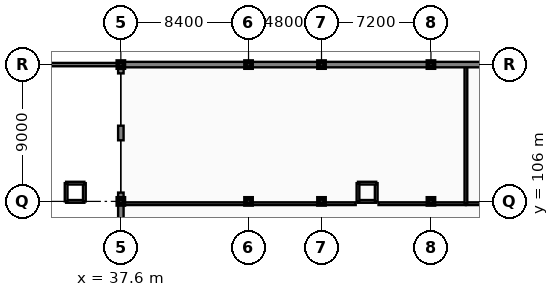
"""IFC4 building model, lengths in metres.
Left out: names, types, materials, properties, quantities, classifications, styles, units other than length and angle.
Written with IfcOpenShell. Run it as: python <this file> out.ifc"""

import sys

from ifc_helpers import new_model, si_unit, direction, frame, frame_2d, origin, origin_2d, place, context, subcontext, project, spatial, rectangle, extrude, element, fill, save


model = new_model("IFC4")
c1 = context("Model", 3, precision=1e-05, world=origin(), true_north=direction((0.0, 1.0)))
c2 = subcontext(c1, "Body", "Model", "MODEL_VIEW")
j1 = project(units=[si_unit("LENGTHUNIT", "METRE"), si_unit("PLANEANGLEUNIT", "RADIAN")], contexts=[c1])
p1 = place(None, origin())
s1 = spatial("IfcSite", under=j1, at=p1, CompositionType="ELEMENT")
p2 = place(p1, origin())
s2 = spatial("IfcBuilding", under=s1, at=p2, CompositionType="ELEMENT")
p3 = place(p2, frame((0.0, 0.0, 17.7)))
s3 = spatial("IfcBuildingStorey", under=s2, at=p3, CompositionType="ELEMENT", Elevation=17.7)
for number, where, z_axis, x_axis in (
    (1, (37.6, 106.0, 0.0), (0.0, 0.0, 1.0), (1.0, 0.0, 0.0)),
    (2, (37.6, 115.0, 0.0), (0.0, 0.0, 1.0), (1.0, 0.0, 0.0)),
    (3, (46.0, 106.0, 0.0), (0.0, 0.0, 1.0), (1.0, 0.0, 0.0)),
    (4, (46.0, 115.0, 0.0), (0.0, 0.0, 1.0), (1.0, 0.0, 0.0)),
    (5, (50.8, 106.0, 0.0), (0.0, 0.0, 1.0), (1.0, 0.0, 0.0)),
    (6, (50.8, 115.0, 0.0), (0.0, 0.0, 1.0), (1.0, 0.0, 0.0)),
    (7, (58.0, 106.0, 0.0), (0.0, 0.0, 1.0), (1.0, 0.0, 0.0)),
    (8, (58.0, 115.0, 0.0), (0.0, 0.0, 1.0), (1.0, 0.0, 0.0)),
):
    element("IfcColumn", number, at=place(p3, frame(where, z_axis=z_axis, x_axis=x_axis)), inside=s3, PredefinedType="COLUMN", context=c2, shape_type="SweptSolid", body=[
        extrude(rectangle(XDim=0.4, YDim=0.4, at=origin_2d()), origin(), (0.0, 0.0, 1.0), 3.9),
    ])
p4 = place(p3, frame((37.74, 105.85, 0.0), z_axis=(0.0, 0.0, 1.0), x_axis=(1.0, 0.0, 0.0)))
e9 = element("IfcWall", 9, at=p4, inside=s3, PredefinedType="PARTITIONING", context=c2, shape_type="SweptSolid", body=[
    extrude(rectangle(XDim=15.31, YDim=0.18, at=frame_2d((7.655, 0.0))), origin(), (0.0, 0.0, 1.0), 3.01),
])
p5 = place(p4, frame((4.387, 0.0, -0.01)))
e10 = element("IfcOpeningElement", 10, at=p5, cuts=e9, PredefinedType="OPENING", context=c2, shape_type="SweptSolid", body=[
    extrude(rectangle(XDim=1.6, YDim=2.21, at=frame_2d((0.8, 1.105))), frame((0.0, 0.1, 0.0), z_axis=(0.0, -1.0, 0.0), x_axis=(1.0, 0.0, 0.0)), (0.0, 0.0, 1.0), 0.2),
])
p6 = place(p3, frame((54.55, 105.85, 0.0), z_axis=(0.0, 0.0, 1.0), x_axis=(1.0, 0.0, 0.0)))
e11 = element("IfcWall", 11, at=p6, inside=s3, PredefinedType="PARTITIONING", context=c2, shape_type="SweptSolid", body=[
    extrude(rectangle(XDim=5.75, YDim=0.18, at=frame_2d((2.875, 0.0))), origin(), (0.0, 0.0, 1.0), 3.3),
])
p7 = place(p3, frame((60.3, 105.85, 0.0), z_axis=(0.0, 0.0, 1.0), x_axis=(1.0, 0.0, 0.0)))
e12 = element("IfcWall", 12, at=p7, inside=s3, PredefinedType="PARTITIONING", context=c2, shape_type="SweptSolid", body=[
    extrude(rectangle(XDim=15.1, YDim=0.18, at=frame_2d((7.55, 0.0))), origin(), (0.0, 0.0, 1.0), 3.21),
])
p8 = place(p7, frame((7.05, 0.0, -0.01)))
e13 = element("IfcOpeningElement", 13, at=p8, cuts=e12, PredefinedType="OPENING", context=c2, shape_type="SweptSolid", body=[
    extrude(rectangle(XDim=1.0, YDim=2.16, at=frame_2d((0.5, 1.08))), frame((0.0, 0.1, 0.0), z_axis=(0.0, -1.0, 0.0), x_axis=(1.0, 0.0, 0.0)), (0.0, 0.0, 1.0), 0.2),
])
p9 = place(p3, frame((60.3, 105.85, 0.0), z_axis=(0.0, 0.0, 1.0), x_axis=(0.0, 1.0, 0.0)))
e14 = element("IfcWall", 14, at=p9, inside=s3, PredefinedType="PARTITIONING", context=c2, shape_type="SweptSolid", body=[
    extrude(rectangle(XDim=9.01, YDim=0.18, at=frame_2d((4.505, 0.0))), origin(), (0.0, 0.0, 1.0), 3.21),
])
p10 = place(p3, frame((46.0, 115.0, 0.0), z_axis=(0.0, 0.0, 1.0), x_axis=(-1.0, 0.0, 0.0)))
e15 = element("IfcWall", 15, at=p10, inside=s3, PredefinedType="SOLIDWALL", context=c2, shape_type="SweptSolid", body=[
    extrude(rectangle(XDim=8.4, YDim=0.36, at=frame_2d((4.2, 0.0))), origin(), (0.0, 0.0, 1.0), 3.01),
])
p11 = place(p10, frame((0.46, 0.0, 0.75)))
e16 = element("IfcOpeningElement", 16, at=p11, cuts=e15, PredefinedType="OPENING", context=c2, shape_type="SweptSolid", body=[
    extrude(rectangle(XDim=1.55, YDim=2.12, at=frame_2d((0.775, 1.06))), frame((0.0, 0.19, 0.0), z_axis=(0.0, -1.0, 0.0), x_axis=(1.0, 0.0, 0.0)), (0.0, 0.0, 1.0), 0.38),
])
p12 = place(p10, frame((6.26, 0.0, 0.75)))
e17 = element("IfcOpeningElement", 17, at=p12, cuts=e15, PredefinedType="OPENING", context=c2, shape_type="SweptSolid", body=[
    extrude(rectangle(XDim=1.55, YDim=2.12, at=frame_2d((0.775, 1.06))), frame((0.0, 0.19, 0.0), z_axis=(0.0, -1.0, 0.0), x_axis=(1.0, 0.0, 0.0)), (0.0, 0.0, 1.0), 0.38),
])
p13 = place(p3, frame((50.8, 115.0, 0.0), z_axis=(0.0, 0.0, 1.0), x_axis=(-1.0, 0.0, 0.0)))
e18 = element("IfcWall", 18, at=p13, inside=s3, PredefinedType="SOLIDWALL", context=c2, shape_type="SweptSolid", body=[
    extrude(rectangle(XDim=4.8, YDim=0.36, at=frame_2d((2.4, 0.0))), origin(), (0.0, 0.0, 1.0), 3.01),
])
p14 = place(p13, frame((0.46, 0.0, 0.75)))
e19 = element("IfcOpeningElement", 19, at=p14, cuts=e18, PredefinedType="OPENING", context=c2, shape_type="SweptSolid", body=[
    extrude(rectangle(XDim=1.55, YDim=2.12, at=frame_2d((0.775, 1.06))), frame((0.0, 0.19, 0.0), z_axis=(0.0, -1.0, 0.0), x_axis=(1.0, 0.0, 0.0)), (0.0, 0.0, 1.0), 0.38),
])
p15 = place(p13, frame((2.66, 0.0, 0.75)))
e20 = element("IfcOpeningElement", 20, at=p15, cuts=e18, PredefinedType="OPENING", context=c2, shape_type="SweptSolid", body=[
    extrude(rectangle(XDim=1.55, YDim=2.12, at=frame_2d((0.775, 1.06))), frame((0.0, 0.19, 0.0), z_axis=(0.0, -1.0, 0.0), x_axis=(1.0, 0.0, 0.0)), (0.0, 0.0, 1.0), 0.38),
])
p16 = place(p3, frame((58.0, 115.0, 0.0), z_axis=(0.0, 0.0, 1.0), x_axis=(-1.0, 0.0, 0.0)))
e21 = element("IfcWall", 21, at=p16, inside=s3, PredefinedType="SOLIDWALL", context=c2, shape_type="SweptSolid", body=[
    extrude(rectangle(XDim=7.2, YDim=0.36, at=frame_2d((3.6, 0.0))), origin(), (0.0, 0.0, 1.0), 3.4),
])
p17 = place(p16, frame((0.46, 0.0, 0.75)))
e22 = element("IfcOpeningElement", 22, at=p17, cuts=e21, PredefinedType="OPENING", context=c2, shape_type="SweptSolid", body=[
    extrude(rectangle(XDim=1.55, YDim=2.3, at=frame_2d((0.775, 1.15))), frame((0.0, 0.19, 0.0), z_axis=(0.0, -1.0, 0.0), x_axis=(1.0, 0.0, 0.0)), (0.0, 0.0, 1.0), 0.38),
])
p18 = place(p16, frame((5.06, 0.0, 0.75)))
e23 = element("IfcOpeningElement", 23, at=p18, cuts=e21, PredefinedType="OPENING", context=c2, shape_type="SweptSolid", body=[
    extrude(rectangle(XDim=1.55, YDim=2.3, at=frame_2d((0.775, 1.15))), frame((0.0, 0.19, 0.0), z_axis=(0.0, -1.0, 0.0), x_axis=(1.0, 0.0, 0.0)), (0.0, 0.0, 1.0), 0.38),
])
p19 = place(p3, frame((65.2, 115.0, 0.0), z_axis=(0.0, 0.0, 1.0), x_axis=(-1.0, 0.0, 0.0)))
e24 = element("IfcWall", 24, at=p19, inside=s3, PredefinedType="SOLIDWALL", context=c2, shape_type="SweptSolid", body=[
    extrude(rectangle(XDim=7.2, YDim=0.36, at=frame_2d((3.6, 0.0))), origin(), (0.0, 0.0, 1.0), 3.21),
])
p20 = place(p19, frame((0.46, 0.0, 0.75)))
e25 = element("IfcOpeningElement", 25, at=p20, cuts=e24, PredefinedType="OPENING", context=c2, shape_type="SweptSolid", body=[
    extrude(rectangle(XDim=1.55, YDim=2.3, at=frame_2d((0.775, 1.15))), frame((0.0, 0.19, 0.0), z_axis=(0.0, -1.0, 0.0), x_axis=(1.0, 0.0, 0.0)), (0.0, 0.0, 1.0), 0.38),
])
p21 = place(p19, frame((3.06, 0.0, 0.75)))
e26 = element("IfcOpeningElement", 26, at=p21, cuts=e24, PredefinedType="OPENING", context=c2, shape_type="SweptSolid", body=[
    extrude(rectangle(XDim=1.55, YDim=2.3, at=frame_2d((0.775, 1.15))), frame((0.0, 0.19, 0.0), z_axis=(0.0, -1.0, 0.0), x_axis=(1.0, 0.0, 0.0)), (0.0, 0.0, 1.0), 0.38),
])
p22 = place(p3, frame((37.6, 106.0, 0.0), z_axis=(0.0, 0.0, 1.0), x_axis=(0.0, -1.0, 0.0)))
e27 = element("IfcWall", 27, at=p22, inside=s3, PredefinedType="SOLIDWALL", context=c2, shape_type="SweptSolid", body=[
    extrude(rectangle(XDim=8.4, YDim=0.36, at=frame_2d((4.2, 0.0))), origin(), (0.0, 0.0, 1.0), 3.01),
])
p23 = place(p22, frame((0.46, 0.0, 0.75)))
e28 = element("IfcOpeningElement", 28, at=p23, cuts=e27, PredefinedType="OPENING", context=c2, shape_type="SweptSolid", body=[
    extrude(rectangle(XDim=1.55, YDim=2.12, at=frame_2d((0.775, 1.06))), frame((0.0, 0.19, 0.0), z_axis=(0.0, -1.0, 0.0), x_axis=(1.0, 0.0, 0.0)), (0.0, 0.0, 1.0), 0.38),
])
p24 = place(p22, frame((6.26, 0.0, 0.75)))
e29 = element("IfcOpeningElement", 29, at=p24, cuts=e27, PredefinedType="OPENING", context=c2, shape_type="SweptSolid", body=[
    extrude(rectangle(XDim=1.55, YDim=2.12, at=frame_2d((0.775, 1.06))), frame((0.0, 0.19, 0.0), z_axis=(0.0, -1.0, 0.0), x_axis=(1.0, 0.0, 0.0)), (0.0, 0.0, 1.0), 0.38),
])
p25 = place(p3, frame((37.6, 110.98, 0.0), z_axis=(0.0, 0.0, 1.0), x_axis=(0.0, -1.0, 0.0)))
e30 = element("IfcWall", 30, at=p25, inside=s3, PredefinedType="SOLIDWALL", context=c2, shape_type="SweptSolid", body=[
    extrude(rectangle(XDim=0.96, YDim=0.36, at=frame_2d((0.48, 0.0))), origin(), (0.0, 0.0, 1.0), 3.01),
])
for number, where, z_axis, x_axis in (
    (31, (37.6, 114.87, 0.0), (0.0, 0.0, 1.0), (0.0, -1.0, 0.0)),
    (32, (37.6, 106.58, 0.0), (0.0, 0.0, 1.0), (0.0, -1.0, 0.0)),
):
    element("IfcWall", number, at=place(p3, frame(where, z_axis=z_axis, x_axis=x_axis)), inside=s3, PredefinedType="SOLIDWALL", context=c2, shape_type="SweptSolid", body=[
        extrude(rectangle(XDim=0.45, YDim=0.36, at=frame_2d((0.225, 0.0))), origin(), (0.0, 0.0, 1.0), 3.01),
    ])
p26 = place(p3, frame((29.2, 115.0, 0.0), z_axis=(0.0, 0.0, 1.0), x_axis=(1.0, 0.0, 0.0)))
e33 = element("IfcWall", 33, at=p26, inside=s3, PredefinedType="PARAPET", context=c2, shape_type="SweptSolid", body=[
    extrude(rectangle(XDim=8.22, YDim=0.22, at=frame_2d((4.11, 0.0))), origin(), (0.0, 0.0, 1.0), 1.25),
])
p27 = place(p3, frame((34.0, 106.0, 0.0), z_axis=(0.0, 0.0, 1.0), x_axis=(1.0, 0.0, 0.0)))
e34 = element("IfcWall", 34, at=p27, inside=s3, PredefinedType="SOLIDWALL", context=c2, shape_type="SweptSolid", body=[
    extrude(rectangle(XDim=1.2, YDim=0.18, at=frame_2d((0.6, 0.0))), origin(), (0.0, 0.0, 1.0), 3.69),
])
p28 = place(p27, frame((0.2, 0.0, -0.01)))
e35 = element("IfcOpeningElement", 35, at=p28, cuts=e34, PredefinedType="OPENING", context=c2, shape_type="SweptSolid", body=[
    extrude(rectangle(XDim=0.8, YDim=2.06, at=frame_2d((0.4, 1.03))), frame((0.0, 0.1, 0.0), z_axis=(0.0, -1.0, 0.0), x_axis=(1.0, 0.0, 0.0)), (0.0, 0.0, 1.0), 0.2),
])
for number, where, z_axis, x_axis in (
    (36, (35.2, 106.0, 0.0), (0.0, 0.0, 1.0), (0.0, 1.0, 0.0)),
    (37, (35.2, 107.2, 0.0), (0.0, 0.0, 1.0), (-1.0, 0.0, 0.0)),
    (38, (34.0, 107.2, 0.0), (0.0, 0.0, 1.0), (0.0, -1.0, 0.0)),
):
    element("IfcWall", number, at=place(p3, frame(where, z_axis=z_axis, x_axis=x_axis)), inside=s3, PredefinedType="SOLIDWALL", context=c2, shape_type="SweptSolid", body=[
        extrude(rectangle(XDim=1.2, YDim=0.18, at=frame_2d((0.6, 0.0))), origin(), (0.0, 0.0, 1.0), 3.69),
    ])
p29 = place(p3, frame((53.2, 106.0, 0.0), z_axis=(0.0, 0.0, 1.0), x_axis=(1.0, 0.0, 0.0)))
e39 = element("IfcWall", 39, at=p29, inside=s3, PredefinedType="SOLIDWALL", context=c2, shape_type="SweptSolid", body=[
    extrude(rectangle(XDim=1.2, YDim=0.18, at=frame_2d((0.6, 0.0))), origin(), (0.0, 0.0, 1.0), 3.69),
])
p30 = place(p29, frame((0.2, 0.0, -0.01)))
e40 = element("IfcOpeningElement", 40, at=p30, cuts=e39, PredefinedType="OPENING", context=c2, shape_type="SweptSolid", body=[
    extrude(rectangle(XDim=0.8, YDim=2.06, at=frame_2d((0.4, 1.03))), frame((0.0, 0.1, 0.0), z_axis=(0.0, -1.0, 0.0), x_axis=(1.0, 0.0, 0.0)), (0.0, 0.0, 1.0), 0.2),
])
for number, where, z_axis, x_axis in (
    (41, (54.4, 106.0, 0.0), (0.0, 0.0, 1.0), (0.0, 1.0, 0.0)),
    (42, (54.4, 107.2, 0.0), (0.0, 0.0, 1.0), (-1.0, 0.0, 0.0)),
    (43, (53.2, 107.2, 0.0), (0.0, 0.0, 1.0), (0.0, -1.0, 0.0)),
):
    element("IfcWall", number, at=place(p3, frame(where, z_axis=z_axis, x_axis=x_axis)), inside=s3, PredefinedType="SOLIDWALL", context=c2, shape_type="SweptSolid", body=[
        extrude(rectangle(XDim=1.2, YDim=0.18, at=frame_2d((0.6, 0.0))), origin(), (0.0, 0.0, 1.0), 3.69),
    ])
p31 = place(p5, frame((0.0, 0.0, 0.01)))
e44 = element("IfcDoor", 44, at=p31, inside=s3, OperationType="DOUBLE_SWING_LEFT", PredefinedType="DOOR", context=c2, shape_type="SweptSolid", body=[
    extrude(rectangle(XDim=1.6, YDim=2.2, at=frame_2d((0.8, 1.1))), frame((0.0, 0.025, 0.0), z_axis=(0.0, -1.0, 0.0), x_axis=(1.0, 0.0, 0.0)), (0.0, 0.0, 1.0), 0.05),
])
fill(e10, e44)
p32 = place(p11, origin())
e45 = element("IfcWindow", 45, at=p32, inside=s3, PartitioningType="DOUBLE_PANEL_HORIZONTAL", PredefinedType="WINDOW", context=c2, shape_type="SweptSolid", body=[
    extrude(rectangle(XDim=1.55, YDim=2.12, at=frame_2d((0.775, 1.06))), frame((0.0, 0.03, 0.0), z_axis=(0.0, -1.0, 0.0), x_axis=(1.0, 0.0, 0.0)), (0.0, 0.0, 1.0), 0.06),
])
fill(e16, e45)
p33 = place(p12, origin())
e46 = element("IfcWindow", 46, at=p33, inside=s3, PartitioningType="DOUBLE_PANEL_HORIZONTAL", PredefinedType="WINDOW", context=c2, shape_type="SweptSolid", body=[
    extrude(rectangle(XDim=1.55, YDim=2.12, at=frame_2d((0.775, 1.06))), frame((0.0, 0.03, 0.0), z_axis=(0.0, -1.0, 0.0), x_axis=(1.0, 0.0, 0.0)), (0.0, 0.0, 1.0), 0.06),
])
fill(e17, e46)
p34 = place(p14, origin())
e47 = element("IfcWindow", 47, at=p34, inside=s3, PartitioningType="DOUBLE_PANEL_HORIZONTAL", PredefinedType="WINDOW", context=c2, shape_type="SweptSolid", body=[
    extrude(rectangle(XDim=1.55, YDim=2.12, at=frame_2d((0.775, 1.06))), frame((0.0, 0.03, 0.0), z_axis=(0.0, -1.0, 0.0), x_axis=(1.0, 0.0, 0.0)), (0.0, 0.0, 1.0), 0.06),
])
fill(e19, e47)
p35 = place(p15, origin())
e48 = element("IfcWindow", 48, at=p35, inside=s3, PartitioningType="DOUBLE_PANEL_HORIZONTAL", PredefinedType="WINDOW", context=c2, shape_type="SweptSolid", body=[
    extrude(rectangle(XDim=1.55, YDim=2.12, at=frame_2d((0.775, 1.06))), frame((0.0, 0.03, 0.0), z_axis=(0.0, -1.0, 0.0), x_axis=(1.0, 0.0, 0.0)), (0.0, 0.0, 1.0), 0.06),
])
fill(e20, e48)
p36 = place(p17, origin())
e49 = element("IfcWindow", 49, at=p36, inside=s3, PartitioningType="DOUBLE_PANEL_HORIZONTAL", PredefinedType="WINDOW", context=c2, shape_type="SweptSolid", body=[
    extrude(rectangle(XDim=1.55, YDim=2.3, at=frame_2d((0.775, 1.15))), frame((0.0, 0.03, 0.0), z_axis=(0.0, -1.0, 0.0), x_axis=(1.0, 0.0, 0.0)), (0.0, 0.0, 1.0), 0.06),
])
fill(e22, e49)
p37 = place(p18, origin())
e50 = element("IfcWindow", 50, at=p37, inside=s3, PartitioningType="DOUBLE_PANEL_HORIZONTAL", PredefinedType="WINDOW", context=c2, shape_type="SweptSolid", body=[
    extrude(rectangle(XDim=1.55, YDim=2.3, at=frame_2d((0.775, 1.15))), frame((0.0, 0.03, 0.0), z_axis=(0.0, -1.0, 0.0), x_axis=(1.0, 0.0, 0.0)), (0.0, 0.0, 1.0), 0.06),
])
fill(e23, e50)
p38 = place(p21, origin())
e51 = element("IfcWindow", 51, at=p38, inside=s3, PartitioningType="DOUBLE_PANEL_HORIZONTAL", PredefinedType="WINDOW", context=c2, shape_type="SweptSolid", body=[
    extrude(rectangle(XDim=1.55, YDim=2.3, at=frame_2d((0.775, 1.15))), frame((0.0, 0.03, 0.0), z_axis=(0.0, -1.0, 0.0), x_axis=(1.0, 0.0, 0.0)), (0.0, 0.0, 1.0), 0.06),
])
fill(e26, e51)
p39 = place(p23, origin())
e52 = element("IfcWindow", 52, at=p39, inside=s3, PartitioningType="DOUBLE_PANEL_HORIZONTAL", PredefinedType="WINDOW", context=c2, shape_type="SweptSolid", body=[
    extrude(rectangle(XDim=1.55, YDim=2.12, at=frame_2d((0.775, 1.06))), frame((0.0, 0.03, 0.0), z_axis=(0.0, -1.0, 0.0), x_axis=(1.0, 0.0, 0.0)), (0.0, 0.0, 1.0), 0.06),
])
fill(e28, e52)
p40 = place(p28, frame((0.0, 0.0, 0.01)))
e53 = element("IfcDoor", 53, at=p40, inside=s3, OperationType="SINGLE_SWING_LEFT", PredefinedType="DOOR", context=c2, shape_type="SweptSolid", body=[
    extrude(rectangle(XDim=0.8, YDim=2.05, at=frame_2d((0.4, 1.025))), frame((0.0, 0.025, 0.0), z_axis=(0.0, -1.0, 0.0), x_axis=(1.0, 0.0, 0.0)), (0.0, 0.0, 1.0), 0.05),
])
fill(e35, e53)
p41 = place(p30, frame((0.0, 0.0, 0.01)))
e54 = element("IfcDoor", 54, at=p41, inside=s3, OperationType="SINGLE_SWING_RIGHT", PredefinedType="DOOR", context=c2, shape_type="SweptSolid", body=[
    extrude(rectangle(XDim=0.8, YDim=2.05, at=frame_2d((0.4, 1.025))), frame((0.0, 0.025, 0.0), z_axis=(0.0, -1.0, 0.0), x_axis=(1.0, 0.0, 0.0)), (0.0, 0.0, 1.0), 0.05),
])
fill(e40, e54)
save(model, sys.argv[1])
